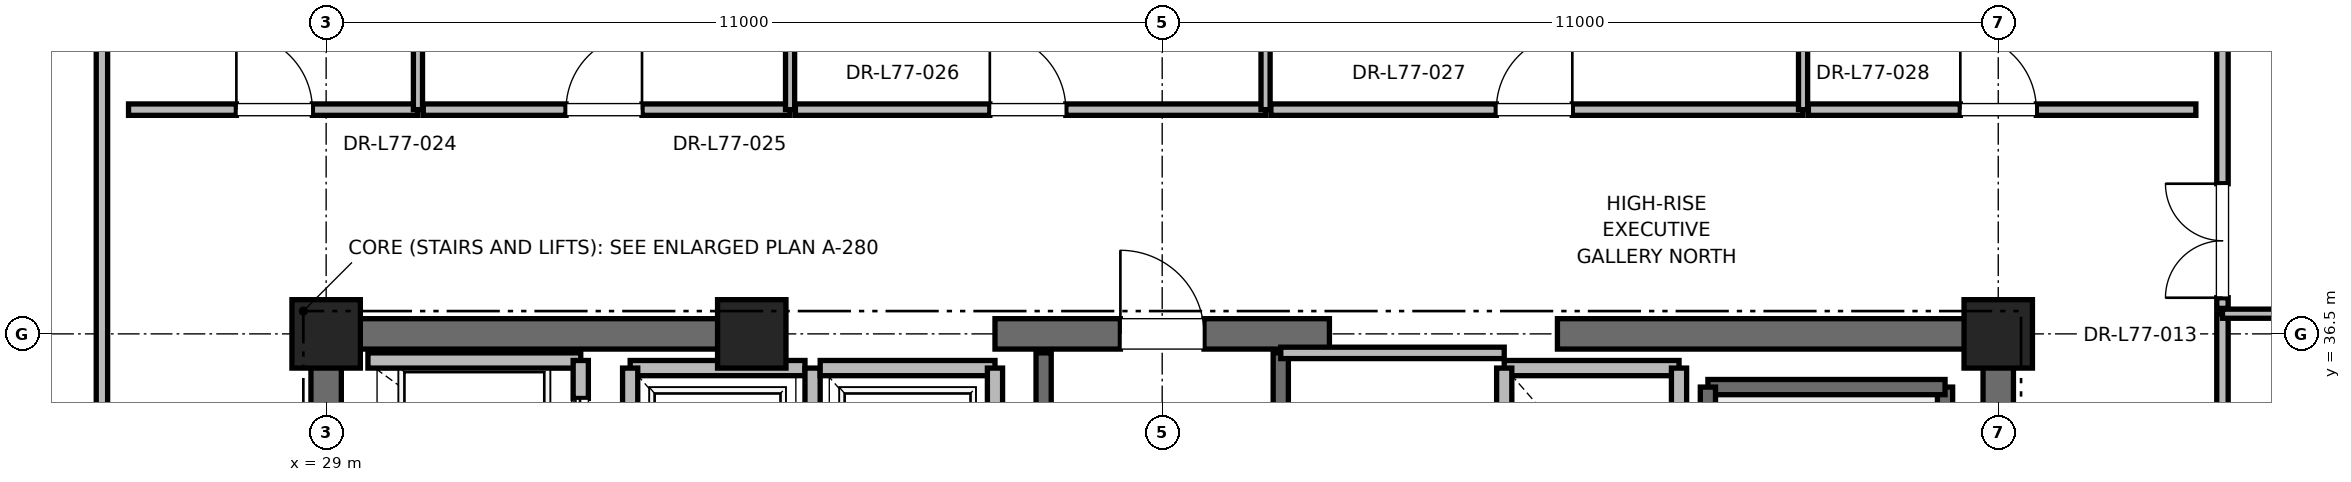
"""IFC4 building model, lengths in metres.
Left out: names, types, materials, properties, quantities, classifications, styles, units other than length and angle.
Written with IfcOpenShell. Run it as: python <this file> out.ifc"""

import sys

from ifc_helpers import new_model, si_unit, direction, frame, frame_2d, origin, origin_2d, place, context, subcontext, project, spatial, rectangle, extrude, element, fill, save


model = new_model("IFC4")
c1 = context("Model", 3, precision=1e-05, world=origin(), true_north=direction((0.0, 1.0)))
c2 = subcontext(c1, "Body", "Model", "MODEL_VIEW")
j1 = project(units=[si_unit("LENGTHUNIT", "METRE"), si_unit("PLANEANGLEUNIT", "RADIAN")], contexts=[c1])
p1 = place(None, origin())
s1 = spatial("IfcSite", under=j1, at=p1, CompositionType="ELEMENT")
p2 = place(p1, origin())
s2 = spatial("IfcBuilding", under=s1, at=p2, CompositionType="ELEMENT")
p3 = place(p2, frame((0.0, 0.0, 330.8)))
s3 = spatial("IfcBuildingStorey", under=s2, at=p3, CompositionType="ELEMENT", Elevation=330.8)
for number, where, z_axis, x_axis in (
    (1, (29.0, 36.5, 0.0), (0.0, 0.0, 1.0), (1.0, 0.0, 0.0)),
    (2, (51.0, 36.5, 0.0), (0.0, 0.0, 1.0), (1.0, 0.0, 0.0)),
    (3, (34.6, 36.5, 0.0), (0.0, 0.0, 1.0), (1.0, 0.0, 0.0)),
):
    element("IfcColumn", number, at=place(p3, frame(where, z_axis=z_axis, x_axis=x_axis)), inside=s3, PredefinedType="PILASTER", context=c2, shape_type="SweptSolid", body=[
        extrude(rectangle(XDim=0.9, YDim=0.9, at=origin_2d()), origin(), (0.0, 0.0, 1.0), 4.0),
    ])
p4 = place(p3, frame((29.0, 36.5, 0.0), z_axis=(0.0, 0.0, 1.0), x_axis=(1.0, 0.0, 0.0)))
e4 = element("IfcWall", 4, at=p4, inside=s3, PredefinedType="SHEAR", context=c2, shape_type="SweptSolid", body=[
    extrude(rectangle(XDim=5.8, YDim=0.4, at=frame_2d((2.9, 0.0))), origin(), (0.0, 0.0, 1.0), 3.785),
])
p5 = place(p3, frame((37.8, 36.5, 0.0), z_axis=(0.0, 0.0, 1.0), x_axis=(1.0, 0.0, 0.0)))
e5 = element("IfcWall", 5, at=p5, inside=s3, PredefinedType="SHEAR", context=c2, shape_type="SweptSolid", body=[
    extrude(rectangle(XDim=4.4, YDim=0.4, at=frame_2d((2.2, 0.0))), origin(), (0.0, 0.0, 1.0), 3.785),
])
p6 = place(p5, frame((1.65, 0.0, 0.0)))
e6 = element("IfcOpeningElement", 6, at=p6, cuts=e5, PredefinedType="OPENING", context=c2, shape_type="SweptSolid", body=[
    extrude(rectangle(XDim=1.1, YDim=2.15, at=frame_2d((0.55, 1.075))), frame((0.0, 0.2, 0.0), z_axis=(0.0, -1.0, 0.0), x_axis=(1.0, 0.0, 0.0)), (0.0, 0.0, 1.0), 0.4),
])
for number, where, z_axis, x_axis in (
    (7, (45.2, 36.5, 0.0), (0.0, 0.0, 1.0), (1.0, 0.0, 0.0)),
    (8, (29.0, 30.7, 0.0), (0.0, 0.0, 1.0), (0.0, 1.0, 0.0)),
):
    element("IfcWall", number, at=place(p3, frame(where, z_axis=z_axis, x_axis=x_axis)), inside=s3, PredefinedType="SHEAR", context=c2, shape_type="SweptSolid", body=[
        extrude(rectangle(XDim=5.8, YDim=0.4, at=frame_2d((2.9, 0.0))), origin(), (0.0, 0.0, 1.0), 3.785),
    ])
p7 = place(p3, frame((51.0, 27.7, 0.0), z_axis=(0.0, 0.0, 1.0), x_axis=(0.0, 1.0, 0.0)))
e9 = element("IfcWall", 9, at=p7, inside=s3, PredefinedType="SHEAR", context=c2, shape_type="SweptSolid", body=[
    extrude(rectangle(XDim=8.8, YDim=0.4, at=frame_2d((4.4, 0.0))), origin(), (0.0, 0.0, 1.0), 3.785),
])
p8 = place(p3, frame((50.3, 27.65, 0.0), z_axis=(0.0, 0.0, 1.0), x_axis=(0.0, 1.0, 0.0)))
e10 = element("IfcWall", 10, at=p8, inside=s3, PredefinedType="SOLIDWALL", context=c2, shape_type="SweptSolid", body=[
    extrude(rectangle(XDim=8.15, YDim=0.2, at=frame_2d((4.075, 0.0))), origin(), (0.0, 0.0, 1.0), 3.785),
])
p9 = place(p3, frame((47.18, 35.8, 0.0), z_axis=(0.0, 0.0, 1.0), x_axis=(1.0, 0.0, 0.0)))
e11 = element("IfcWall", 11, at=p9, inside=s3, PredefinedType="SOLIDWALL", context=c2, shape_type="SweptSolid", body=[
    extrude(rectangle(XDim=3.12, YDim=0.2, at=frame_2d((1.56, 0.0))), origin(), (0.0, 0.0, 1.0), 3.785),
])
p10 = place(p3, frame((47.18, 27.62, 0.0), z_axis=(0.0, 0.0, 1.0), x_axis=(0.0, 1.0, 0.0)))
e12 = element("IfcWall", 12, at=p10, inside=s3, PredefinedType="SOLIDWALL", context=c2, shape_type="SweptSolid", body=[
    extrude(rectangle(XDim=8.18, YDim=0.2, at=frame_2d((4.09, 0.0))), origin(), (0.0, 0.0, 1.0), 3.785),
])
p11 = place(p3, frame((38.44, 27.38, 0.0), z_axis=(0.0, 0.0, 1.0), x_axis=(0.0, 1.0, 0.0)))
e13 = element("IfcWall", 13, at=p11, inside=s3, PredefinedType="SOLIDWALL", context=c2, shape_type="SweptSolid", body=[
    extrude(rectangle(XDim=8.87, YDim=0.2, at=frame_2d((4.435, 0.0))), origin(), (0.0, 0.0, 1.0), 3.785),
])
p12 = place(p3, frame((41.56, 27.68, 0.0), z_axis=(0.0, 0.0, 1.0), x_axis=(0.0, 1.0, 0.0)))
e14 = element("IfcWall", 14, at=p12, inside=s3, PredefinedType="SOLIDWALL", context=c2, shape_type="SweptSolid", body=[
    extrude(rectangle(XDim=8.57, YDim=0.2, at=frame_2d((4.285, 0.0))), origin(), (0.0, 0.0, 1.0), 3.785),
])
p13 = place(p3, frame((32.35, 36.15, 0.0), z_axis=(0.0, 0.0, 1.0), x_axis=(-1.0, 0.0, 0.0)))
e15 = element("IfcWall", 15, at=p13, inside=s3, PredefinedType="SOLIDWALL", context=c2, shape_type="SweptSolid", body=[
    extrude(rectangle(XDim=2.8, YDim=0.2, at=frame_2d((1.4, 0.0))), origin(), (0.0, 0.0, 1.0), 3.22),
])
p14 = place(p3, frame((32.35, 34.05, 0.0), z_axis=(0.0, 0.0, 1.0), x_axis=(0.0, 1.0, 0.0)))
e16 = element("IfcWall", 16, at=p14, inside=s3, PredefinedType="SOLIDWALL", context=c2, shape_type="SweptSolid", body=[
    extrude(rectangle(XDim=2.1, YDim=0.2, at=frame_2d((1.05, 0.0))), origin(), (0.0, 0.0, 1.0), 3.785),
])
p15 = place(p14, frame((0.5, 0.0, 0.0)))
e17 = element("IfcOpeningElement", 17, at=p15, cuts=e16, PredefinedType="OPENING", context=c2, shape_type="SweptSolid", body=[
    extrude(rectangle(XDim=1.1, YDim=2.2, at=frame_2d((0.55, 1.1))), frame((0.0, 0.1, 0.0), z_axis=(0.0, -1.0, 0.0), x_axis=(1.0, 0.0, 0.0)), (0.0, 0.0, 1.0), 0.2),
])
p16 = place(p3, frame((35.3, 36.05, 0.0), z_axis=(0.0, 0.0, 1.0), x_axis=(-1.0, 0.0, 0.0)))
e18 = element("IfcWall", 18, at=p16, inside=s3, PredefinedType="SOLIDWALL", context=c2, shape_type="SweptSolid", body=[
    extrude(rectangle(XDim=2.3, YDim=0.2, at=frame_2d((1.15, 0.0))), origin(), (0.0, 0.0, 1.0), 2.865),
])
p17 = place(p3, frame((33.0, 36.05, 0.0), z_axis=(0.0, 0.0, 1.0), x_axis=(0.0, -1.0, 0.0)))
e19 = element("IfcWall", 19, at=p17, inside=s3, PredefinedType="SOLIDWALL", context=c2, shape_type="SweptSolid", body=[
    extrude(rectangle(XDim=2.6, YDim=0.2, at=frame_2d((1.3, 0.0))), origin(), (0.0, 0.0, 1.0), 3.785),
])
p18 = place(p3, frame((35.4, 33.45, 0.0), z_axis=(0.0, 0.0, 1.0), x_axis=(0.0, 1.0, 0.0)))
e20 = element("IfcWall", 20, at=p18, inside=s3, PredefinedType="SOLIDWALL", context=c2, shape_type="SweptSolid", body=[
    extrude(rectangle(XDim=2.6, YDim=0.2, at=frame_2d((1.3, 0.0))), origin(), (0.0, 0.0, 1.0), 2.865),
])
p19 = place(p3, frame((37.8, 36.05, 0.0), z_axis=(0.0, 0.0, 1.0), x_axis=(-1.0, 0.0, 0.0)))
e21 = element("IfcWall", 21, at=p19, inside=s3, PredefinedType="SOLIDWALL", context=c2, shape_type="SweptSolid", body=[
    extrude(rectangle(XDim=2.3, YDim=0.2, at=frame_2d((1.15, 0.0))), origin(), (0.0, 0.0, 1.0), 2.865),
])
p20 = place(p3, frame((37.8, 33.45, 0.0), z_axis=(0.0, 0.0, 1.0), x_axis=(0.0, 1.0, 0.0)))
e22 = element("IfcWall", 22, at=p20, inside=s3, PredefinedType="SOLIDWALL", context=c2, shape_type="SweptSolid", body=[
    extrude(rectangle(XDim=2.6, YDim=0.2, at=frame_2d((1.3, 0.0))), origin(), (0.0, 0.0, 1.0), 2.865),
])
p21 = place(p3, frame((46.8, 36.05, 0.0), z_axis=(0.0, 0.0, 1.0), x_axis=(-1.0, 0.0, 0.0)))
e23 = element("IfcWall", 23, at=p21, inside=s3, PredefinedType="SOLIDWALL", context=c2, shape_type="SweptSolid", body=[
    extrude(rectangle(XDim=2.3, YDim=0.2, at=frame_2d((1.15, 0.0))), origin(), (0.0, 0.0, 1.0), 2.865),
])
p22 = place(p3, frame((44.5, 36.05, 0.0), z_axis=(0.0, 0.0, 1.0), x_axis=(0.0, -1.0, 0.0)))
e24 = element("IfcWall", 24, at=p22, inside=s3, PredefinedType="SOLIDWALL", context=c2, shape_type="SweptSolid", body=[
    extrude(rectangle(XDim=2.6, YDim=0.2, at=frame_2d((1.3, 0.0))), origin(), (0.0, 0.0, 1.0), 2.865),
])
p23 = place(p3, frame((46.8, 33.45, 0.0), z_axis=(0.0, 0.0, 1.0), x_axis=(0.0, 1.0, 0.0)))
e25 = element("IfcWall", 25, at=p23, inside=s3, PredefinedType="SOLIDWALL", context=c2, shape_type="SweptSolid", body=[
    extrude(rectangle(XDim=2.6, YDim=0.2, at=frame_2d((1.3, 0.0))), origin(), (0.0, 0.0, 1.0), 3.785),
])
p24 = place(p3, frame((41.56, 36.25, 0.0), z_axis=(0.0, 0.0, 1.0), x_axis=(1.0, 0.0, 0.0)))
e26 = element("IfcWall", 26, at=p24, inside=s3, PredefinedType="PARTITIONING", context=c2, shape_type="SweptSolid", body=[
    extrude(rectangle(XDim=2.94, YDim=0.15, at=frame_2d((1.47, 0.0))), origin(), (0.0, 0.0, 1.0), 2.85),
])
p25 = place(p3, frame((26.4, 39.45, 0.0), z_axis=(0.0, 0.0, 1.0), x_axis=(1.0, 0.0, 0.0)))
e27 = element("IfcWall", 27, at=p25, inside=s3, PredefinedType="PARTITIONING", context=c2, shape_type="SweptSolid", body=[
    extrude(rectangle(XDim=3.808, YDim=0.15, at=frame_2d((1.904, 0.0))), origin(), (0.0, 0.0, 1.0), 2.85),
])
p26 = place(p25, frame((1.419, 0.0, 0.0)))
e28 = element("IfcOpeningElement", 28, at=p26, cuts=e27, PredefinedType="OPENING", context=c2, shape_type="SweptSolid", body=[
    extrude(rectangle(XDim=1.0, YDim=2.15, at=frame_2d((0.5, 1.075))), frame((0.0, 0.075, 0.0), z_axis=(0.0, -1.0, 0.0), x_axis=(1.0, 0.0, 0.0)), (0.0, 0.0, 1.0), 0.15),
])
p27 = place(p3, frame((30.208, 39.45, 0.0), z_axis=(0.0, 0.0, 1.0), x_axis=(0.0, 1.0, 0.0)))
e29 = element("IfcWall", 29, at=p27, inside=s3, PredefinedType="PARTITIONING", context=c2, shape_type="SweptSolid", body=[
    extrude(rectangle(XDim=9.468, YDim=0.12, at=frame_2d((4.734, 0.0))), origin(), (0.0, 0.0, 1.0), 2.415),
])
p28 = place(p3, frame((30.278, 39.45, 0.0), z_axis=(0.0, 0.0, 1.0), x_axis=(1.0, 0.0, 0.0)))
e30 = element("IfcWall", 30, at=p28, inside=s3, PredefinedType="PARTITIONING", context=c2, shape_type="SweptSolid", body=[
    extrude(rectangle(XDim=4.826, YDim=0.15, at=frame_2d((2.413, 0.0))), origin(), (0.0, 0.0, 1.0), 2.85),
])
p29 = place(p28, frame((1.878, 0.0, 0.0)))
e31 = element("IfcOpeningElement", 31, at=p29, cuts=e30, PredefinedType="OPENING", context=c2, shape_type="SweptSolid", body=[
    extrude(rectangle(XDim=1.0, YDim=2.15, at=frame_2d((0.5, 1.075))), frame((0.0, 0.075, 0.0), z_axis=(0.0, -1.0, 0.0), x_axis=(1.0, 0.0, 0.0)), (0.0, 0.0, 1.0), 0.15),
])
p30 = place(p3, frame((35.104, 39.45, 0.0), z_axis=(0.0, 0.0, 1.0), x_axis=(0.0, 1.0, 0.0)))
e32 = element("IfcWall", 32, at=p30, inside=s3, PredefinedType="PARTITIONING", context=c2, shape_type="SweptSolid", body=[
    extrude(rectangle(XDim=9.468, YDim=0.12, at=frame_2d((4.734, 0.0))), origin(), (0.0, 0.0, 1.0), 2.415),
])
p31 = place(p3, frame((35.174, 39.45, 0.0), z_axis=(0.0, 0.0, 1.0), x_axis=(1.0, 0.0, 0.0)))
e33 = element("IfcWall", 33, at=p31, inside=s3, PredefinedType="PARTITIONING", context=c2, shape_type="SweptSolid", body=[
    extrude(rectangle(XDim=6.186, YDim=0.15, at=frame_2d((3.093, 0.0))), origin(), (0.0, 0.0, 1.0), 2.85),
])
p32 = place(p31, frame((2.558, 0.0, 0.0)))
e34 = element("IfcOpeningElement", 34, at=p32, cuts=e33, PredefinedType="OPENING", context=c2, shape_type="SweptSolid", body=[
    extrude(rectangle(XDim=1.0, YDim=2.15, at=frame_2d((0.5, 1.075))), frame((0.0, 0.075, 0.0), z_axis=(0.0, -1.0, 0.0), x_axis=(1.0, 0.0, 0.0)), (0.0, 0.0, 1.0), 0.15),
])
p33 = place(p3, frame((41.36, 39.45, 0.0), z_axis=(0.0, 0.0, 1.0), x_axis=(0.0, 1.0, 0.0)))
e35 = element("IfcWall", 35, at=p33, inside=s3, PredefinedType="PARTITIONING", context=c2, shape_type="SweptSolid", body=[
    extrude(rectangle(XDim=9.468, YDim=0.12, at=frame_2d((4.734, 0.0))), origin(), (0.0, 0.0, 1.0), 2.415),
])
p34 = place(p3, frame((41.43, 39.45, 0.0), z_axis=(0.0, 0.0, 1.0), x_axis=(1.0, 0.0, 0.0)))
e36 = element("IfcWall", 36, at=p34, inside=s3, PredefinedType="PARTITIONING", context=c2, shape_type="SweptSolid", body=[
    extrude(rectangle(XDim=7.002, YDim=0.15, at=frame_2d((3.501, 0.0))), origin(), (0.0, 0.0, 1.0), 2.85),
])
p35 = place(p34, frame((2.966, 0.0, 0.0)))
e37 = element("IfcOpeningElement", 37, at=p35, cuts=e36, PredefinedType="OPENING", context=c2, shape_type="SweptSolid", body=[
    extrude(rectangle(XDim=1.0, YDim=2.15, at=frame_2d((0.5, 1.075))), frame((0.0, 0.075, 0.0), z_axis=(0.0, -1.0, 0.0), x_axis=(1.0, 0.0, 0.0)), (0.0, 0.0, 1.0), 0.15),
])
p36 = place(p3, frame((48.432, 39.45, 0.0), z_axis=(0.0, 0.0, 1.0), x_axis=(0.0, 1.0, 0.0)))
e38 = element("IfcWall", 38, at=p36, inside=s3, PredefinedType="PARTITIONING", context=c2, shape_type="SweptSolid", body=[
    extrude(rectangle(XDim=9.468, YDim=0.12, at=frame_2d((4.734, 0.0))), origin(), (0.0, 0.0, 1.0), 2.415),
])
p37 = place(p3, frame((48.502, 39.45, 0.0), z_axis=(0.0, 0.0, 1.0), x_axis=(1.0, 0.0, 0.0)))
e39 = element("IfcWall", 39, at=p37, inside=s3, PredefinedType="PARTITIONING", context=c2, shape_type="SweptSolid", body=[
    extrude(rectangle(XDim=5.098, YDim=0.15, at=frame_2d((2.549, 0.0))), origin(), (0.0, 0.0, 1.0), 2.85),
])
p38 = place(p37, frame((1.999, 0.0, 0.0)))
e40 = element("IfcOpeningElement", 40, at=p38, cuts=e39, PredefinedType="OPENING", context=c2, shape_type="SweptSolid", body=[
    extrude(rectangle(XDim=1.0, YDim=2.15, at=frame_2d((0.5, 1.075))), frame((0.0, 0.075, 0.0), z_axis=(0.0, -1.0, 0.0), x_axis=(1.0, 0.0, 0.0)), (0.0, 0.0, 1.0), 0.15),
])
p39 = place(p3, frame((26.05, 33.272, 0.0), z_axis=(0.0, 0.0, 1.0), x_axis=(0.0, 1.0, 0.0)))
e41 = element("IfcWall", 41, at=p39, inside=s3, PredefinedType="PARTITIONING", context=c2, shape_type="SweptSolid", body=[
    extrude(rectangle(XDim=12.046, YDim=0.15, at=frame_2d((6.023, 0.0))), origin(), (0.0, 0.0, 1.0), 2.85),
])
p40 = place(p39, frame((1.064, 0.0, 0.0)))
e42 = element("IfcOpeningElement", 42, at=p40, cuts=e41, PredefinedType="OPENING", context=c2, shape_type="SweptSolid", body=[
    extrude(rectangle(XDim=1.0, YDim=2.15, at=frame_2d((0.5, 1.075))), frame((0.0, 0.075, 0.0), z_axis=(0.0, -1.0, 0.0), x_axis=(1.0, 0.0, 0.0)), (0.0, 0.0, 1.0), 0.15),
])
p41 = place(p3, frame((53.95, 23.294, 0.0), z_axis=(0.0, 0.0, 1.0), x_axis=(0.0, 1.0, 0.0)))
e43 = element("IfcWall", 43, at=p41, inside=s3, PredefinedType="PARTITIONING", context=c2, shape_type="SweptSolid", body=[
    extrude(rectangle(XDim=13.472, YDim=0.15, at=frame_2d((6.736, 0.0))), origin(), (0.0, 0.0, 1.0), 2.85),
])
p42 = place(p41, frame((6.028, 0.0, 0.0)))
e44 = element("IfcOpeningElement", 44, at=p42, cuts=e43, PredefinedType="OPENING", context=c2, shape_type="SweptSolid", body=[
    extrude(rectangle(XDim=1.05, YDim=2.2, at=frame_2d((0.525, 1.1))), frame((0.0, 0.075, 0.0), z_axis=(0.0, -1.0, 0.0), x_axis=(1.0, 0.0, 0.0)), (0.0, 0.0, 1.0), 0.15),
])
p43 = place(p3, frame((53.95, 36.765, 0.0), z_axis=(0.0, 0.0, 1.0), x_axis=(1.0, 0.0, 0.0)))
e45 = element("IfcWall", 45, at=p43, inside=s3, PredefinedType="PARTITIONING", context=c2, shape_type="SweptSolid", body=[
    extrude(rectangle(XDim=10.586, YDim=0.12, at=frame_2d((5.293, 0.0))), origin(), (0.0, 0.0, 1.0), 2.85),
])
p44 = place(p3, frame((53.95, 36.835, 0.0), z_axis=(0.0, 0.0, 1.0), x_axis=(0.0, 1.0, 0.0)))
e46 = element("IfcWall", 46, at=p44, inside=s3, PredefinedType="PARTITIONING", context=c2, shape_type="SweptSolid", body=[
    extrude(rectangle(XDim=8.483, YDim=0.15, at=frame_2d((4.241, 0.0))), origin(), (0.0, 0.0, 1.0), 2.85),
])
p45 = place(p44, frame((0.14, 0.0, 0.0)))
e47 = element("IfcOpeningElement", 47, at=p45, cuts=e46, PredefinedType="OPENING", context=c2, shape_type="SweptSolid", body=[
    extrude(rectangle(XDim=1.5, YDim=2.25, at=frame_2d((0.75, 1.125))), frame((0.0, 0.075, 0.0), z_axis=(0.0, -1.0, 0.0), x_axis=(1.0, 0.0, 0.0)), (0.0, 0.0, 1.0), 0.15),
])
p46 = place(p6, origin())
e48 = element("IfcDoor", 48, at=p46, inside=s3, OperationType="SINGLE_SWING_LEFT", PredefinedType="DOOR", context=c2, shape_type="SweptSolid", body=[
    extrude(rectangle(XDim=1.1, YDim=2.15, at=frame_2d((0.55, 1.075))), frame((0.0, 0.025, 0.0), z_axis=(0.0, -1.0, 0.0), x_axis=(1.0, 0.0, 0.0)), (0.0, 0.0, 1.0), 0.05),
])
fill(e6, e48)
p47 = place(p15, origin())
e49 = element("IfcDoor", 49, at=p47, inside=s3, OperationType="SLIDING_TO_RIGHT", PredefinedType="DOOR", context=c2, shape_type="SweptSolid", body=[
    extrude(rectangle(XDim=1.1, YDim=2.2, at=frame_2d((0.55, 1.1))), frame((0.0, 0.025, 0.0), z_axis=(0.0, -1.0, 0.0), x_axis=(1.0, 0.0, 0.0)), (0.0, 0.0, 1.0), 0.05),
])
fill(e17, e49)
p48 = place(p26, origin())
e50 = element("IfcDoor", 50, at=p48, inside=s3, OperationType="SINGLE_SWING_LEFT", PredefinedType="DOOR", context=c2, shape_type="SweptSolid", body=[
    extrude(rectangle(XDim=1.0, YDim=2.15, at=frame_2d((0.5, 1.075))), frame((0.0, 0.025, 0.0), z_axis=(0.0, -1.0, 0.0), x_axis=(1.0, 0.0, 0.0)), (0.0, 0.0, 1.0), 0.05),
])
fill(e28, e50)
p49 = place(p29, origin())
e51 = element("IfcDoor", 51, at=p49, inside=s3, OperationType="SINGLE_SWING_RIGHT", PredefinedType="DOOR", context=c2, shape_type="SweptSolid", body=[
    extrude(rectangle(XDim=1.0, YDim=2.15, at=frame_2d((0.5, 1.075))), frame((0.0, 0.025, 0.0), z_axis=(0.0, -1.0, 0.0), x_axis=(1.0, 0.0, 0.0)), (0.0, 0.0, 1.0), 0.05),
])
fill(e31, e51)
p50 = place(p32, origin())
e52 = element("IfcDoor", 52, at=p50, inside=s3, OperationType="SINGLE_SWING_LEFT", PredefinedType="DOOR", context=c2, shape_type="SweptSolid", body=[
    extrude(rectangle(XDim=1.0, YDim=2.15, at=frame_2d((0.5, 1.075))), frame((0.0, 0.025, 0.0), z_axis=(0.0, -1.0, 0.0), x_axis=(1.0, 0.0, 0.0)), (0.0, 0.0, 1.0), 0.05),
])
fill(e34, e52)
p51 = place(p35, origin())
e53 = element("IfcDoor", 53, at=p51, inside=s3, OperationType="SINGLE_SWING_RIGHT", PredefinedType="DOOR", context=c2, shape_type="SweptSolid", body=[
    extrude(rectangle(XDim=1.0, YDim=2.15, at=frame_2d((0.5, 1.075))), frame((0.0, 0.025, 0.0), z_axis=(0.0, -1.0, 0.0), x_axis=(1.0, 0.0, 0.0)), (0.0, 0.0, 1.0), 0.05),
])
fill(e37, e53)
p52 = place(p38, origin())
e54 = element("IfcDoor", 54, at=p52, inside=s3, OperationType="SINGLE_SWING_LEFT", PredefinedType="DOOR", context=c2, shape_type="SweptSolid", body=[
    extrude(rectangle(XDim=1.0, YDim=2.15, at=frame_2d((0.5, 1.075))), frame((0.0, 0.025, 0.0), z_axis=(0.0, -1.0, 0.0), x_axis=(1.0, 0.0, 0.0)), (0.0, 0.0, 1.0), 0.05),
])
fill(e40, e54)
p53 = place(p45, origin())
e55 = element("IfcDoor", 55, at=p53, inside=s3, OperationType="DOUBLE_DOOR_SINGLE_SWING", PredefinedType="DOOR", context=c2, shape_type="SweptSolid", body=[
    extrude(rectangle(XDim=1.5, YDim=2.25, at=frame_2d((0.75, 1.125))), frame((0.0, 0.025, 0.0), z_axis=(0.0, -1.0, 0.0), x_axis=(1.0, 0.0, 0.0)), (0.0, 0.0, 1.0), 0.05),
])
fill(e47, e55)
save(model, sys.argv[1])
